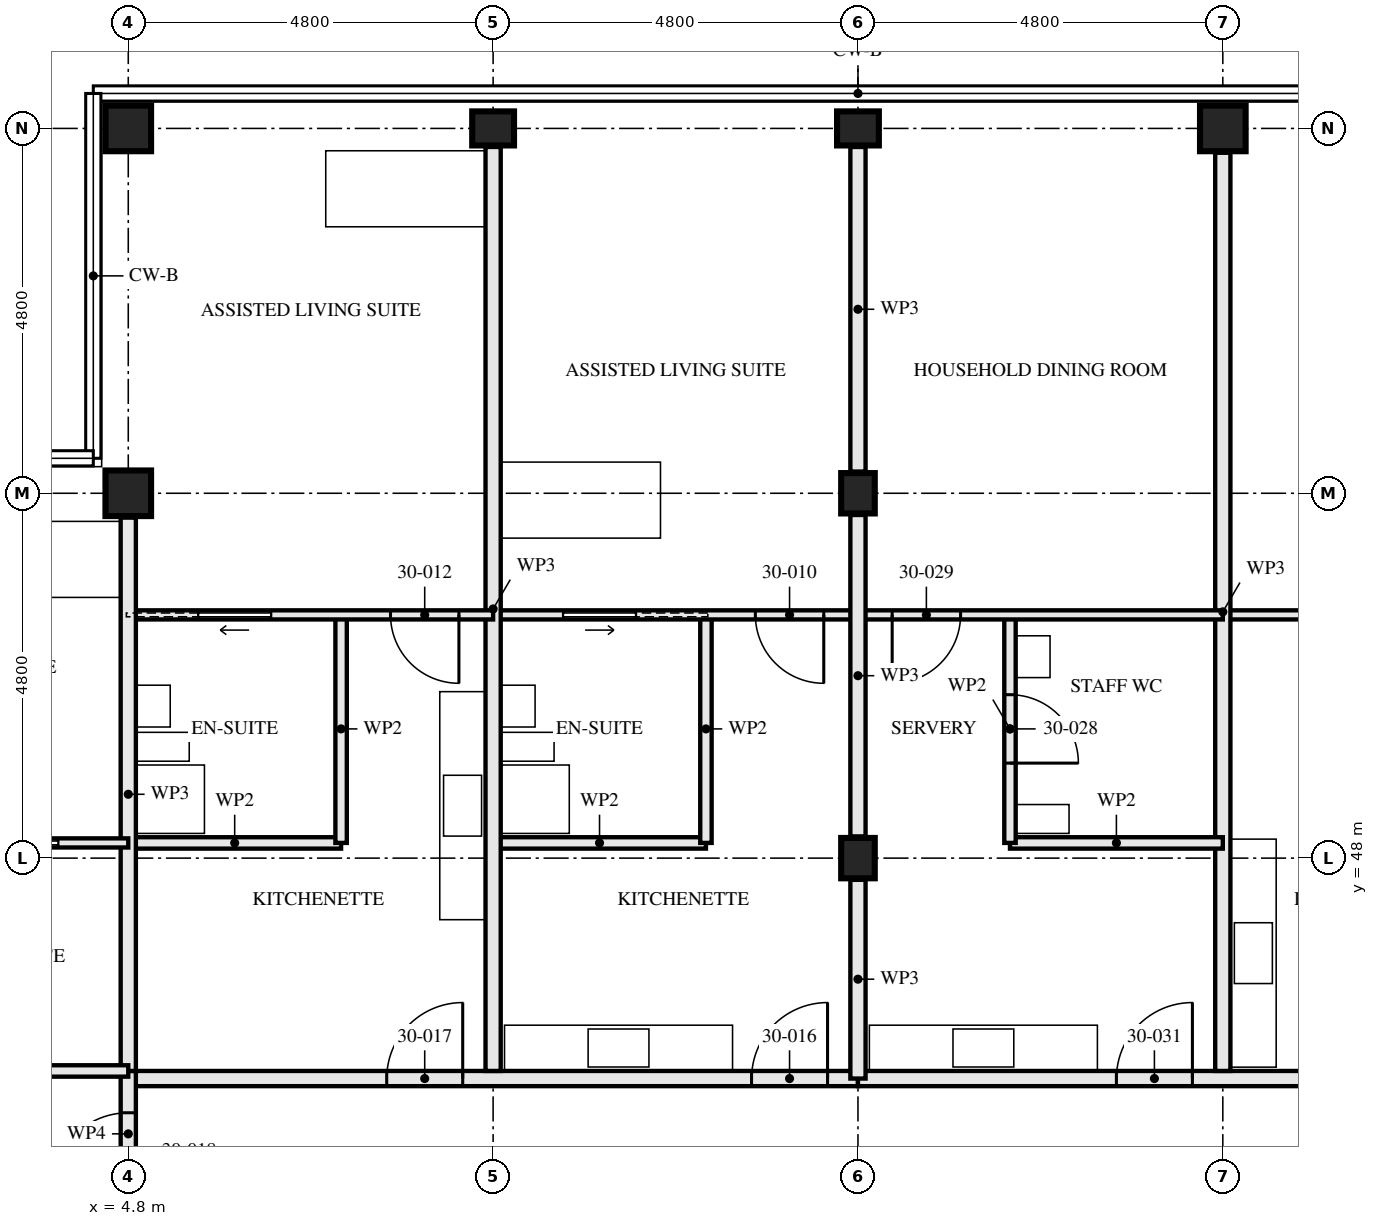
"""IFC4 building model, lengths in metres.
Left out: names, types, materials, properties, quantities, classifications, styles, units other than length and angle.
Written with IfcOpenShell. Run it as: python <this file> out.ifc"""

import sys

from ifc_helpers import new_model, si_unit, direction, frame, frame_2d, origin, origin_2d, place, context, subcontext, project, spatial, rectangle, hollow_rectangle, i_section, extrude, element, fill, save


model = new_model("IFC4")
c1 = context("Model", 3, precision=1e-05, world=origin(), true_north=direction((0.0, 1.0)))
c2 = subcontext(c1, "Body", "Model", "MODEL_VIEW")
j1 = project(units=[si_unit("LENGTHUNIT", "METRE"), si_unit("PLANEANGLEUNIT", "RADIAN")], contexts=[c1])
p1 = place(None, origin())
s1 = spatial("IfcSite", under=j1, at=p1, CompositionType="ELEMENT")
p2 = place(p1, origin())
s2 = spatial("IfcBuilding", under=s1, at=p2, CompositionType="ELEMENT")
p3 = place(p2, frame((0.0, 0.0, 112.0)))
s3 = spatial("IfcBuildingStorey", under=s2, at=p3, CompositionType="ELEMENT", Elevation=112.0)
for number, where, z_axis, x_axis in (
    (1, (4.8, 52.8, 0.0), (0.0, 0.0, 1.0), (0.0, 1.0, 0.0)),
    (2, (4.8, 57.6, 0.0), (0.0, 0.0, 1.0), (0.0, 1.0, 0.0)),
):
    element("IfcColumn", number, at=place(p3, frame(where, z_axis=z_axis, x_axis=x_axis)), inside=s3, PredefinedType="COLUMN", context=c2, shape_type="SweptSolid", body=[
        extrude(hollow_rectangle(XDim=0.6, YDim=0.6, WallThickness=0.05, at=origin_2d()), origin(), (0.0, 0.0, 1.0), 3.5),
    ])
p4 = place(p3, frame((9.6, 57.6, 0.0), z_axis=(0.0, 0.0, 1.0), x_axis=(0.0, 1.0, 0.0)))
e3 = element("IfcColumn", 3, at=p4, inside=s3, PredefinedType="COLUMN", context=c2, shape_type="SweptSolid", body=[
    extrude(i_section(OverallWidth=0.448, OverallDepth=0.55, WebThickness=0.072, FlangeThickness=0.115, FilletRadius=0.015, at=origin_2d()), origin(), (0.0, 0.0, 1.0), 3.5),
])
for number, where, z_axis, x_axis in (
    (4, (14.4, 48.0, 0.0), (0.0, 0.0, 1.0), (1.0, 0.0, 0.0)),
    (5, (14.4, 52.8, 0.0), (0.0, 0.0, 1.0), (1.0, 0.0, 0.0)),
):
    element("IfcColumn", number, at=place(p3, frame(where, z_axis=z_axis, x_axis=x_axis)), inside=s3, PredefinedType="COLUMN", context=c2, shape_type="SweptSolid", body=[
        extrude(i_section(OverallWidth=0.442, OverallDepth=0.531, WebThickness=0.066, FlangeThickness=0.106, FilletRadius=0.015, at=origin_2d()), origin(), (0.0, 0.0, 1.0), 3.5),
    ])
p5 = place(p3, frame((14.4, 57.6, 0.0), z_axis=(0.0, 0.0, 1.0), x_axis=(0.0, 1.0, 0.0)))
e6 = element("IfcColumn", 6, at=p5, inside=s3, PredefinedType="COLUMN", context=c2, shape_type="SweptSolid", body=[
    extrude(i_section(OverallWidth=0.448, OverallDepth=0.55, WebThickness=0.072, FlangeThickness=0.115, FilletRadius=0.015, at=origin_2d()), origin(), (0.0, 0.0, 1.0), 3.5),
])
p6 = place(p3, frame((19.2, 57.6, 0.0), z_axis=(0.0, 0.0, 1.0), x_axis=(0.0, 1.0, 0.0)))
e7 = element("IfcColumn", 7, at=p6, inside=s3, PredefinedType="COLUMN", context=c2, shape_type="SweptSolid", body=[
    extrude(hollow_rectangle(XDim=0.6, YDim=0.6, WallThickness=0.06, at=origin_2d()), origin(), (0.0, 0.0, 1.0), 3.5),
])
p7 = place(p3, frame((12.4, 51.2, 0.0), z_axis=(0.0, 0.0, 1.0), x_axis=(0.0, -1.0, 0.0)))
e8 = element("IfcWall", 8, at=p7, inside=s3, PredefinedType="PARTITIONING", context=c2, shape_type="SweptSolid", body=[
    extrude(rectangle(XDim=3.0, YDim=0.15, at=frame_2d((1.5, 0.0))), origin(), (0.0, 0.0, 1.0), 3.33),
])
p8 = place(p3, frame((12.4, 48.2, 0.0), z_axis=(0.0, 0.0, 1.0), x_axis=(-1.0, 0.0, 0.0)))
e9 = element("IfcWall", 9, at=p8, inside=s3, PredefinedType="PARTITIONING", context=c2, shape_type="SweptSolid", body=[
    extrude(rectangle(XDim=2.8, YDim=0.15, at=frame_2d((1.4, 0.0))), origin(), (0.0, 0.0, 1.0), 3.33),
])
p9 = place(p3, frame((14.4, 51.2, 0.0), z_axis=(0.0, 0.0, 1.0), x_axis=(-1.0, 0.0, 0.0)))
e10 = element("IfcWall", 10, at=p9, inside=s3, PredefinedType="PARTITIONING", context=c2, shape_type="SweptSolid", body=[
    extrude(rectangle(XDim=4.8, YDim=0.12, at=frame_2d((2.4, 0.0))), origin(), (0.0, 0.0, 1.0), 3.33),
])
p10 = place(p9, frame((0.45, 0.0, 0.0)))
e11 = element("IfcOpeningElement", 11, at=p10, cuts=e10, PredefinedType="OPENING", context=c2, shape_type="SweptSolid", body=[
    extrude(rectangle(XDim=0.9, YDim=2.1, at=frame_2d((0.45, 1.05))), frame((0.0, 0.071, 0.0), z_axis=(0.0, -1.0, 0.0), x_axis=(1.0, 0.0, 0.0)), (0.0, 0.0, 1.0), 0.141),
])
p11 = place(p9, frame((2.925, 0.0, 0.0)))
e12 = element("IfcOpeningElement", 12, at=p11, cuts=e10, PredefinedType="OPENING", context=c2, shape_type="SweptSolid", body=[
    extrude(rectangle(XDim=0.95, YDim=2.1, at=frame_2d((0.475, 1.05))), frame((0.0, 0.071, 0.0), z_axis=(0.0, -1.0, 0.0), x_axis=(1.0, 0.0, 0.0)), (0.0, 0.0, 1.0), 0.141),
])
p12 = place(p3, frame((9.6, 57.356, 0.0), z_axis=(0.0, 0.0, 1.0), x_axis=(0.0, -1.0, 0.0)))
e13 = element("IfcWall", 13, at=p12, inside=s3, PredefinedType="PARTITIONING", context=c2, shape_type="SweptSolid", body=[
    extrude(rectangle(XDim=12.156, YDim=0.2, at=frame_2d((6.078, 0.0))), origin(), (0.0, 0.0, 1.0), 2.55),
])
p13 = place(p3, frame((7.6, 51.2, 0.0), z_axis=(0.0, 0.0, 1.0), x_axis=(0.0, -1.0, 0.0)))
e14 = element("IfcWall", 14, at=p13, inside=s3, PredefinedType="PARTITIONING", context=c2, shape_type="SweptSolid", body=[
    extrude(rectangle(XDim=3.0, YDim=0.15, at=frame_2d((1.5, 0.0))), origin(), (0.0, 0.0, 1.0), 3.33),
])
p14 = place(p3, frame((7.6, 48.2, 0.0), z_axis=(0.0, 0.0, 1.0), x_axis=(-1.0, 0.0, 0.0)))
e15 = element("IfcWall", 15, at=p14, inside=s3, PredefinedType="PARTITIONING", context=c2, shape_type="SweptSolid", body=[
    extrude(rectangle(XDim=2.8, YDim=0.15, at=frame_2d((1.4, 0.0))), origin(), (0.0, 0.0, 1.0), 3.33),
])
p15 = place(p3, frame((9.6, 51.2, 0.0), z_axis=(0.0, 0.0, 1.0), x_axis=(-1.0, 0.0, 0.0)))
e16 = element("IfcWall", 16, at=p15, inside=s3, PredefinedType="PARTITIONING", context=c2, shape_type="SweptSolid", body=[
    extrude(rectangle(XDim=4.8, YDim=0.12, at=frame_2d((2.4, 0.0))), origin(), (0.0, 0.0, 1.0), 3.33),
])
p16 = place(p15, frame((0.45, 0.0, 0.0)))
e17 = element("IfcOpeningElement", 17, at=p16, cuts=e16, PredefinedType="OPENING", context=c2, shape_type="SweptSolid", body=[
    extrude(rectangle(XDim=0.9, YDim=2.1, at=frame_2d((0.45, 1.05))), frame((0.0, 0.071, 0.0), z_axis=(0.0, -1.0, 0.0), x_axis=(1.0, 0.0, 0.0)), (0.0, 0.0, 1.0), 0.141),
])
p17 = place(p15, frame((2.925, 0.0, 0.0)))
e18 = element("IfcOpeningElement", 18, at=p17, cuts=e16, PredefinedType="OPENING", context=c2, shape_type="SweptSolid", body=[
    extrude(rectangle(XDim=0.95, YDim=2.1, at=frame_2d((0.475, 1.05))), frame((0.0, 0.071, 0.0), z_axis=(0.0, -1.0, 0.0), x_axis=(1.0, 0.0, 0.0)), (0.0, 0.0, 1.0), 0.141),
])
p18 = place(p3, frame((4.8, 52.48, 0.0), z_axis=(0.0, 0.0, 1.0), x_axis=(0.0, -1.0, 0.0)))
e19 = element("IfcWall", 19, at=p18, inside=s3, PredefinedType="PARTITIONING", context=c2, shape_type="SweptSolid", body=[
    extrude(rectangle(XDim=7.28, YDim=0.2, at=frame_2d((3.64, 0.0))), origin(), (0.0, 0.0, 1.0), 2.55),
])
p19 = place(p3, frame((4.8, 45.2, 0.0), z_axis=(0.0, 0.0, 1.0), x_axis=(-1.0, 0.0, 0.0)))
e20 = element("IfcWall", 20, at=p19, inside=s3, PredefinedType="PARTITIONING", context=c2, shape_type="SweptSolid", body=[
    extrude(rectangle(XDim=2.8, YDim=0.15, at=frame_2d((1.4, 0.0))), origin(), (0.0, 0.0, 1.0), 3.33),
])
p20 = place(p3, frame((4.8, 48.2, 0.0), z_axis=(0.0, 0.0, 1.0), x_axis=(-1.0, 0.0, 0.0)))
e21 = element("IfcWall", 21, at=p20, inside=s3, PredefinedType="PARTITIONING", context=c2, shape_type="SweptSolid", body=[
    extrude(rectangle(XDim=4.556, YDim=0.12, at=frame_2d((2.278, 0.0))), origin(), (0.0, 0.0, 1.0), 3.33),
])
p21 = place(p20, frame((2.975, 0.0, 0.0)))
e22 = element("IfcOpeningElement", 22, at=p21, cuts=e21, PredefinedType="OPENING", context=c2, shape_type="SweptSolid", body=[
    extrude(rectangle(XDim=0.9, YDim=2.1, at=frame_2d((0.45, 1.05))), frame((0.0, 0.071, 0.0), z_axis=(0.0, -1.0, 0.0), x_axis=(1.0, 0.0, 0.0)), (0.0, 0.0, 1.0), 0.141),
])
p22 = place(p20, frame((0.925, 0.0, 0.0)))
e23 = element("IfcOpeningElement", 23, at=p22, cuts=e21, PredefinedType="OPENING", context=c2, shape_type="SweptSolid", body=[
    extrude(rectangle(XDim=0.95, YDim=2.1, at=frame_2d((0.475, 1.05))), frame((0.0, 0.071, 0.0), z_axis=(0.0, -1.0, 0.0), x_axis=(1.0, 0.0, 0.0)), (0.0, 0.0, 1.0), 0.141),
])
p23 = place(p3, frame((14.4, 45.1, 0.0), z_axis=(0.0, 0.0, 1.0), x_axis=(-1.0, 0.0, 0.0)))
e24 = element("IfcWall", 24, at=p23, inside=s3, PredefinedType="PARTITIONING", context=c2, shape_type="SweptSolid", body=[
    extrude(rectangle(XDim=9.6, YDim=0.2, at=frame_2d((4.8, 0.0))), origin(), (0.0, 0.0, 1.0), 3.33),
])
p24 = place(p23, frame((0.4, 0.0, 0.0)))
e25 = element("IfcOpeningElement", 25, at=p24, cuts=e24, PredefinedType="OPENING", context=c2, shape_type="SweptSolid", body=[
    extrude(rectangle(XDim=1.0, YDim=2.1, at=frame_2d((0.5, 1.05))), frame((0.0, 0.111, 0.0), z_axis=(0.0, -1.0, 0.0), x_axis=(1.0, 0.0, 0.0)), (0.0, 0.0, 1.0), 0.221),
])
p25 = place(p23, frame((5.2, 0.0, 0.0)))
e26 = element("IfcOpeningElement", 26, at=p25, cuts=e24, PredefinedType="OPENING", context=c2, shape_type="SweptSolid", body=[
    extrude(rectangle(XDim=1.0, YDim=2.1, at=frame_2d((0.5, 1.05))), frame((0.0, 0.111, 0.0), z_axis=(0.0, -1.0, 0.0), x_axis=(1.0, 0.0, 0.0)), (0.0, 0.0, 1.0), 0.221),
])
p26 = place(p3, frame((4.8, 45.2, 0.0), z_axis=(0.0, 0.0, 1.0), x_axis=(0.0, -1.0, 0.0)))
e27 = element("IfcWall", 27, at=p26, inside=s3, PredefinedType="PARTITIONING", context=c2, shape_type="SweptSolid", body=[
    extrude(rectangle(XDim=1.655, YDim=0.2, at=frame_2d((0.828, 0.0))), origin(), (0.0, 0.0, 1.0), 3.33),
])
p27 = place(p26, frame((0.55, 0.0, 0.0)))
e28 = element("IfcOpeningElement", 28, at=p27, cuts=e27, PredefinedType="OPENING", context=c2, shape_type="SweptSolid", body=[
    extrude(rectangle(XDim=1.0, YDim=2.1, at=frame_2d((0.5, 1.05))), frame((0.0, 0.111, 0.0), z_axis=(0.0, -1.0, 0.0), x_axis=(1.0, 0.0, 0.0)), (0.0, 0.0, 1.0), 0.221),
])
p28 = place(p3, frame((24.0, 51.2, 0.0), z_axis=(0.0, 0.0, 1.0), x_axis=(-1.0, 0.0, 0.0)))
e29 = element("IfcWall", 29, at=p28, inside=s3, PredefinedType="PARTITIONING", context=c2, shape_type="SweptSolid", body=[
    extrude(rectangle(XDim=4.8, YDim=0.12, at=frame_2d((2.4, 0.0))), origin(), (0.0, 0.0, 1.0), 3.33),
])
p29 = place(p3, frame((19.2, 57.28, 0.0), z_axis=(0.0, 0.0, 1.0), x_axis=(0.0, -1.0, 0.0)))
e30 = element("IfcWall", 30, at=p29, inside=s3, PredefinedType="PARTITIONING", context=c2, shape_type="SweptSolid", body=[
    extrude(rectangle(XDim=12.08, YDim=0.2, at=frame_2d((6.04, 0.0))), origin(), (0.0, 0.0, 1.0), 2.55),
])
p30 = place(p3, frame((16.4, 51.2, 0.0), z_axis=(0.0, 0.0, 1.0), x_axis=(0.0, -1.0, 0.0)))
e31 = element("IfcWall", 31, at=p30, inside=s3, PredefinedType="PARTITIONING", context=c2, shape_type="SweptSolid", body=[
    extrude(rectangle(XDim=3.0, YDim=0.15, at=frame_2d((1.5, 0.0))), origin(), (0.0, 0.0, 1.0), 3.33),
])
p31 = place(p30, frame((1.05, 0.0, 0.0)))
e32 = element("IfcOpeningElement", 32, at=p31, cuts=e31, PredefinedType="OPENING", context=c2, shape_type="SweptSolid", body=[
    extrude(rectangle(XDim=0.9, YDim=2.1, at=frame_2d((0.45, 1.05))), frame((0.0, 0.085, 0.0), z_axis=(0.0, -1.0, 0.0), x_axis=(1.0, 0.0, 0.0)), (0.0, 0.0, 1.0), 0.171),
])
p32 = place(p3, frame((19.2, 48.2, 0.0), z_axis=(0.0, 0.0, 1.0), x_axis=(-1.0, 0.0, 0.0)))
e33 = element("IfcWall", 33, at=p32, inside=s3, PredefinedType="PARTITIONING", context=c2, shape_type="SweptSolid", body=[
    extrude(rectangle(XDim=2.8, YDim=0.15, at=frame_2d((1.4, 0.0))), origin(), (0.0, 0.0, 1.0), 3.33),
])
p33 = place(p3, frame((19.2, 51.2, 0.0), z_axis=(0.0, 0.0, 1.0), x_axis=(-1.0, 0.0, 0.0)))
e34 = element("IfcWall", 34, at=p33, inside=s3, PredefinedType="PARTITIONING", context=c2, shape_type="SweptSolid", body=[
    extrude(rectangle(XDim=4.8, YDim=0.12, at=frame_2d((2.4, 0.0))), origin(), (0.0, 0.0, 1.0), 3.33),
])
p34 = place(p33, frame((3.45, 0.0, 0.0)))
e35 = element("IfcOpeningElement", 35, at=p34, cuts=e34, PredefinedType="OPENING", context=c2, shape_type="SweptSolid", body=[
    extrude(rectangle(XDim=0.9, YDim=2.1, at=frame_2d((0.45, 1.05))), frame((0.0, 0.071, 0.0), z_axis=(0.0, -1.0, 0.0), x_axis=(1.0, 0.0, 0.0)), (0.0, 0.0, 1.0), 0.141),
])
p35 = place(p3, frame((29.24, 45.1, 0.0), z_axis=(0.0, 0.0, 1.0), x_axis=(-1.0, 0.0, 0.0)))
e36 = element("IfcWall", 36, at=p35, inside=s3, PredefinedType="PARTITIONING", context=c2, shape_type="SweptSolid", body=[
    extrude(rectangle(XDim=14.84, YDim=0.2, at=frame_2d((7.42, 0.0))), origin(), (0.0, 0.0, 1.0), 2.32),
])
p36 = place(p35, frame((0.84, 0.0, 0.0)))
e37 = element("IfcOpeningElement", 37, at=p36, cuts=e36, PredefinedType="OPENING", context=c2, shape_type="SweptSolid", body=[
    extrude(rectangle(XDim=1.0, YDim=2.1, at=frame_2d((0.5, 1.05))), frame((0.0, 0.111, 0.0), z_axis=(0.0, -1.0, 0.0), x_axis=(1.0, 0.0, 0.0)), (0.0, 0.0, 1.0), 0.221),
])
p37 = place(p35, frame((10.44, 0.0, 0.0)))
e38 = element("IfcOpeningElement", 38, at=p37, cuts=e36, PredefinedType="OPENING", context=c2, shape_type="SweptSolid", body=[
    extrude(rectangle(XDim=1.0, YDim=2.1, at=frame_2d((0.5, 1.05))), frame((0.0, 0.111, 0.0), z_axis=(0.0, -1.0, 0.0), x_axis=(1.0, 0.0, 0.0)), (0.0, 0.0, 1.0), 0.221),
])
p38 = place(p3, frame((14.4, 45.1, 0.0), z_axis=(0.0, 0.0, 1.0), x_axis=(0.0, 1.0, 0.0)))
e39 = element("IfcWall", 39, at=p38, inside=s3, PredefinedType="PARTITIONING", context=c2, shape_type="SweptSolid", body=[
    extrude(rectangle(XDim=2.615, YDim=0.2, at=frame_2d((1.307, 0.0))), origin(), (0.0, 0.0, 1.0), 2.32),
])
p39 = place(p3, frame((14.4, 48.285, 0.0), z_axis=(0.0, 0.0, 1.0), x_axis=(0.0, 1.0, 0.0)))
e40 = element("IfcWall", 40, at=p39, inside=s3, PredefinedType="PARTITIONING", context=c2, shape_type="SweptSolid", body=[
    extrude(rectangle(XDim=4.229, YDim=0.2, at=frame_2d((2.115, 0.0))), origin(), (0.0, 0.0, 1.0), 2.32),
])
p40 = place(p3, frame((14.4, 53.085, 0.0), z_axis=(0.0, 0.0, 1.0), x_axis=(0.0, 1.0, 0.0)))
e41 = element("IfcWall", 41, at=p40, inside=s3, PredefinedType="PARTITIONING", context=c2, shape_type="SweptSolid", body=[
    extrude(rectangle(XDim=4.271, YDim=0.2, at=frame_2d((2.135, 0.0))), origin(), (0.0, 0.0, 1.0), 2.32),
])
p41 = place(p10, origin())
e42 = element("IfcDoor", 42, at=p41, inside=s3, OperationType="SINGLE_SWING_RIGHT", PredefinedType="DOOR", context=c2, shape_type="SweptSolid", body=[
    extrude(rectangle(XDim=0.9, YDim=2.1, at=frame_2d((0.45, 1.05))), frame((0.0, 0.022, 0.0), z_axis=(0.0, -1.0, 0.0), x_axis=(1.0, 0.0, 0.0)), (0.0, 0.0, 1.0), 0.044),
])
fill(e11, e42)
p42 = place(p11, origin())
e43 = element("IfcDoor", 43, at=p42, inside=s3, OperationType="SLIDING_TO_RIGHT", PredefinedType="DOOR", context=c2, shape_type="SweptSolid", body=[
    extrude(rectangle(XDim=0.95, YDim=2.1, at=frame_2d((0.475, 1.05))), frame((0.0, 0.022, 0.0), z_axis=(0.0, -1.0, 0.0), x_axis=(1.0, 0.0, 0.0)), (0.0, 0.0, 1.0), 0.044),
])
fill(e12, e43)
p43 = place(p16, origin())
e44 = element("IfcDoor", 44, at=p43, inside=s3, OperationType="SINGLE_SWING_RIGHT", PredefinedType="DOOR", context=c2, shape_type="SweptSolid", body=[
    extrude(rectangle(XDim=0.9, YDim=2.1, at=frame_2d((0.45, 1.05))), frame((0.0, 0.022, 0.0), z_axis=(0.0, -1.0, 0.0), x_axis=(1.0, 0.0, 0.0)), (0.0, 0.0, 1.0), 0.044),
])
fill(e17, e44)
p44 = place(p17, origin())
e45 = element("IfcDoor", 45, at=p44, inside=s3, OperationType="SLIDING_TO_LEFT", PredefinedType="DOOR", context=c2, shape_type="SweptSolid", body=[
    extrude(rectangle(XDim=0.95, YDim=2.1, at=frame_2d((0.475, 1.05))), frame((0.0, 0.022, 0.0), z_axis=(0.0, -1.0, 0.0), x_axis=(1.0, 0.0, 0.0)), (0.0, 0.0, 1.0), 0.044),
])
fill(e18, e45)
p45 = place(p22, origin())
e46 = element("IfcDoor", 46, at=p45, inside=s3, OperationType="SLIDING_TO_LEFT", PredefinedType="DOOR", context=c2, shape_type="SweptSolid", body=[
    extrude(rectangle(XDim=0.95, YDim=2.1, at=frame_2d((0.475, 1.05))), frame((0.0, 0.022, 0.0), z_axis=(0.0, -1.0, 0.0), x_axis=(1.0, 0.0, 0.0)), (0.0, 0.0, 1.0), 0.044),
])
fill(e23, e46)
p46 = place(p24, frame((1.0, 0.0, 0.0), z_axis=(0.0, 0.0, 1.0), x_axis=(-1.0, 0.0, 0.0)))
e47 = element("IfcDoor", 47, at=p46, inside=s3, OperationType="SINGLE_SWING_LEFT", PredefinedType="DOOR", context=c2, shape_type="SweptSolid", body=[
    extrude(rectangle(XDim=1.0, YDim=2.1, at=frame_2d((0.5, 1.05))), frame((0.0, 0.027, 0.0), z_axis=(0.0, -1.0, 0.0), x_axis=(1.0, 0.0, 0.0)), (0.0, 0.0, 1.0), 0.054),
])
fill(e25, e47)
p47 = place(p25, frame((1.0, 0.0, 0.0), z_axis=(0.0, 0.0, 1.0), x_axis=(-1.0, 0.0, 0.0)))
e48 = element("IfcDoor", 48, at=p47, inside=s3, OperationType="SINGLE_SWING_LEFT", PredefinedType="DOOR", context=c2, shape_type="SweptSolid", body=[
    extrude(rectangle(XDim=1.0, YDim=2.1, at=frame_2d((0.5, 1.05))), frame((0.0, 0.027, 0.0), z_axis=(0.0, -1.0, 0.0), x_axis=(1.0, 0.0, 0.0)), (0.0, 0.0, 1.0), 0.054),
])
fill(e26, e48)
p48 = place(p27, frame((1.0, 0.0, 0.0), z_axis=(0.0, 0.0, 1.0), x_axis=(-1.0, 0.0, 0.0)))
e49 = element("IfcDoor", 49, at=p48, inside=s3, OperationType="SINGLE_SWING_RIGHT", PredefinedType="DOOR", context=c2, shape_type="SweptSolid", body=[
    extrude(rectangle(XDim=1.0, YDim=2.1, at=frame_2d((0.5, 1.05))), frame((0.0, 0.027, 0.0), z_axis=(0.0, -1.0, 0.0), x_axis=(1.0, 0.0, 0.0)), (0.0, 0.0, 1.0), 0.054),
])
fill(e28, e49)
p49 = place(p31, origin())
e50 = element("IfcDoor", 50, at=p49, inside=s3, OperationType="SINGLE_SWING_LEFT", PredefinedType="DOOR", context=c2, shape_type="SweptSolid", body=[
    extrude(rectangle(XDim=0.9, YDim=2.1, at=frame_2d((0.45, 1.05))), frame((0.0, 0.022, 0.0), z_axis=(0.0, -1.0, 0.0), x_axis=(1.0, 0.0, 0.0)), (0.0, 0.0, 1.0), 0.044),
])
fill(e32, e50)
p50 = place(p34, origin())
e51 = element("IfcDoor", 51, at=p50, inside=s3, OperationType="SINGLE_SWING_LEFT", PredefinedType="DOOR", context=c2, shape_type="SweptSolid", body=[
    extrude(rectangle(XDim=0.9, YDim=2.1, at=frame_2d((0.45, 1.05))), frame((0.0, 0.022, 0.0), z_axis=(0.0, -1.0, 0.0), x_axis=(1.0, 0.0, 0.0)), (0.0, 0.0, 1.0), 0.044),
])
fill(e35, e51)
p51 = place(p37, frame((1.0, 0.0, 0.0), z_axis=(0.0, 0.0, 1.0), x_axis=(-1.0, 0.0, 0.0)))
e52 = element("IfcDoor", 52, at=p51, inside=s3, OperationType="SINGLE_SWING_LEFT", PredefinedType="DOOR", context=c2, shape_type="SweptSolid", body=[
    extrude(rectangle(XDim=1.0, YDim=2.1, at=frame_2d((0.5, 1.05))), frame((0.0, 0.027, 0.0), z_axis=(0.0, -1.0, 0.0), x_axis=(1.0, 0.0, 0.0)), (0.0, 0.0, 1.0), 0.054),
])
fill(e38, e52)
save(model, sys.argv[1])
